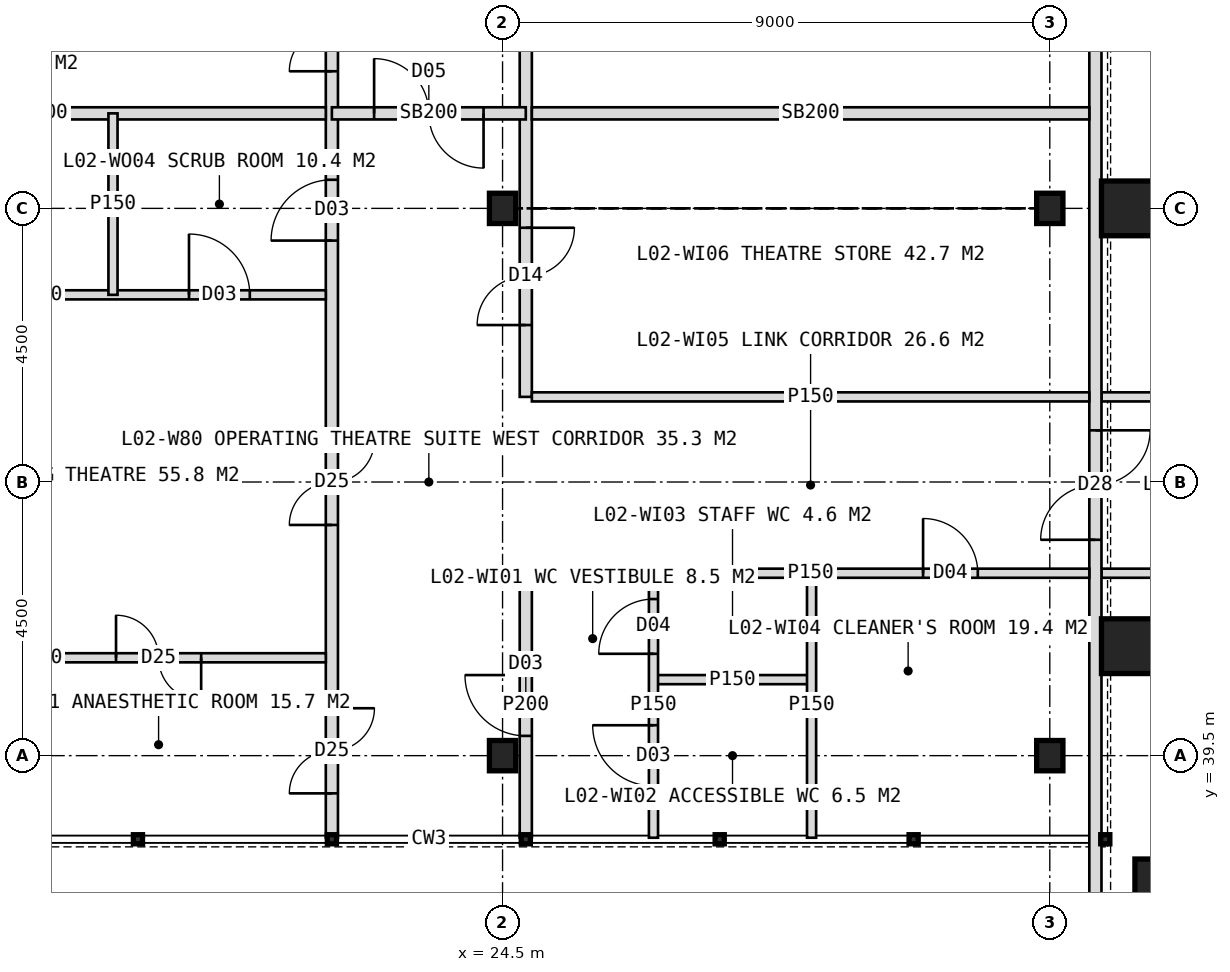
"""IFC4 building model, lengths in metres.
Left out: names, types, materials, properties, quantities, classifications, styles, units other than length and angle.
Written with IfcOpenShell. Run it as: python <this file> out.ifc"""

import sys

from ifc_helpers import new_model, si_unit, direction, frame, frame_2d, origin, origin_2d, place, context, subcontext, project, spatial, rectangle, hollow_rectangle, i_section, extrude, element, fill, save


model = new_model("IFC4")
c1 = context("Model", 3, precision=1e-05, world=origin(), true_north=direction((0.0, 1.0)))
c2 = subcontext(c1, "Body", "Model", "MODEL_VIEW")
j1 = project(units=[si_unit("LENGTHUNIT", "METRE"), si_unit("PLANEANGLEUNIT", "RADIAN")], contexts=[c1])
p1 = place(None, origin())
s1 = spatial("IfcSite", under=j1, at=p1, CompositionType="ELEMENT")
p2 = place(p1, origin())
s2 = spatial("IfcBuilding", under=s1, at=p2, CompositionType="ELEMENT")
p3 = place(p2, frame((0.0, 0.0, 11.0)))
s3 = spatial("IfcBuildingStorey", under=s2, at=p3, CompositionType="ELEMENT", Elevation=11.0)
for number, where, z_axis, x_axis in (
    (1, (34.8, 41.3, 0.0), (0.0, 0.0, 1.0), (1.0, 0.0, 0.0)),
    (2, (34.8, 48.5, 0.0), (0.0, 0.0, 1.0), (1.0, 0.0, 0.0)),
    (3, (35.35, 37.35, 0.0), (0.0, 0.0, 1.0), (1.0, 0.0, 0.0)),
):
    element("IfcColumn", number, at=place(p3, frame(where, z_axis=z_axis, x_axis=x_axis)), inside=s3, PredefinedType="COLUMN", context=c2, shape_type="SweptSolid", body=[
        extrude(hollow_rectangle(XDim=0.9, YDim=0.9, WallThickness=0.08, at=origin_2d()), origin(), (0.0, 0.0, 1.0), 5.5),
    ])
for number, where, z_axis, x_axis in (
    (4, (24.5, 39.5, 0.0), (0.0, 0.0, 1.0), (1.0, 0.0, 0.0)),
    (5, (24.5, 48.5, 0.0), (0.0, 0.0, 1.0), (1.0, 0.0, 0.0)),
    (6, (33.5, 39.5, 0.0), (0.0, 0.0, 1.0), (1.0, 0.0, 0.0)),
    (7, (33.5, 48.5, 0.0), (0.0, 0.0, 1.0), (1.0, 0.0, 0.0)),
):
    element("IfcColumn", number, at=place(p3, frame(where, z_axis=z_axis, x_axis=x_axis)), inside=s3, PredefinedType="COLUMN", context=c2, shape_type="SweptSolid", body=[
        extrude(i_section(OverallWidth=0.432, OverallDepth=0.498, WebThickness=0.056, FlangeThickness=0.089, FilletRadius=0.015, at=origin_2d()), origin(), (0.0, 0.0, 1.0), 5.5),
    ])
for number, where, z_axis, x_axis in (
    (8, (40.5, 42.5, 0.0), (0.0, 0.0, 1.0), (-1.0, 0.0, 0.0)),
    (9, (40.5, 45.4, 0.0), (0.0, 0.0, 1.0), (-1.0, 0.0, 0.0)),
):
    element("IfcWall", number, at=place(p3, frame(where, z_axis=z_axis, x_axis=x_axis)), inside=s3, PredefinedType="PARTITIONING", context=c2, shape_type="SweptSolid", body=[
        extrude(rectangle(XDim=6.15, YDim=0.15, at=frame_2d((3.075, 0.0))), origin(), (0.0, 0.0, 1.0), 5.2),
    ])
p4 = place(p3, frame((21.693, 38.15, 0.0), z_axis=(0.0, 0.0, 1.0), x_axis=(0.0, 1.0, 0.0)))
e10 = element("IfcWall", 10, at=p4, inside=s3, PredefinedType="PARTITIONING", context=c2, shape_type="SweptSolid", body=[
    extrude(rectangle(XDim=47.7, YDim=0.2, at=frame_2d((23.85, 0.0))), origin(), (0.0, 0.0, 1.0), 5.2),
])
p5 = place(p4, frame((45.7, 0.0, 0.0)))
e11 = element("IfcOpeningElement", 11, at=p5, cuts=e10, PredefinedType="OPENING", context=c2, shape_type="SweptSolid", body=[
    extrude(rectangle(XDim=1.2, YDim=2.1, at=frame_2d((0.6, 1.05))), frame((0.0, 0.11, 0.0), z_axis=(0.0, -1.0, 0.0), x_axis=(1.0, 0.0, 0.0)), (0.0, 0.0, 1.0), 0.22),
])
p6 = place(p4, frame((36.244, 0.0, 0.0)))
e12 = element("IfcOpeningElement", 12, at=p6, cuts=e10, PredefinedType="OPENING", context=c2, shape_type="SweptSolid", body=[
    extrude(rectangle(XDim=1.0, YDim=2.1, at=frame_2d((0.5, 1.05))), frame((0.0, 0.11, 0.0), z_axis=(0.0, -1.0, 0.0), x_axis=(1.0, 0.0, 0.0)), (0.0, 0.0, 1.0), 0.22),
])
p7 = place(p4, frame((0.73, 0.0, 0.0)))
e13 = element("IfcOpeningElement", 13, at=p7, cuts=e10, PredefinedType="OPENING", context=c2, shape_type="SweptSolid", body=[
    extrude(rectangle(XDim=1.4, YDim=2.2, at=frame_2d((0.7, 1.1))), frame((0.0, 0.11, 0.0), z_axis=(0.0, -1.0, 0.0), x_axis=(1.0, 0.0, 0.0)), (0.0, 0.0, 1.0), 0.22),
])
p8 = place(p4, frame((5.144, 0.0, 0.0)))
e14 = element("IfcOpeningElement", 14, at=p8, cuts=e10, PredefinedType="OPENING", context=c2, shape_type="SweptSolid", body=[
    extrude(rectangle(XDim=1.4, YDim=2.2, at=frame_2d((0.7, 1.1))), frame((0.0, 0.11, 0.0), z_axis=(0.0, -1.0, 0.0), x_axis=(1.0, 0.0, 0.0)), (0.0, 0.0, 1.0), 0.22),
])
p9 = place(p4, frame((9.82, 0.0, 0.0)))
e15 = element("IfcOpeningElement", 15, at=p9, cuts=e10, PredefinedType="OPENING", context=c2, shape_type="SweptSolid", body=[
    extrude(rectangle(XDim=1.0, YDim=2.1, at=frame_2d((0.5, 1.05))), frame((0.0, 0.11, 0.0), z_axis=(0.0, -1.0, 0.0), x_axis=(1.0, 0.0, 0.0)), (0.0, 0.0, 1.0), 0.22),
])
p10 = place(p4, frame((12.605, 0.0, 0.0)))
e16 = element("IfcOpeningElement", 16, at=p10, cuts=e10, PredefinedType="OPENING", context=c2, shape_type="SweptSolid", body=[
    extrude(rectangle(XDim=1.4, YDim=2.2, at=frame_2d((0.7, 1.1))), frame((0.0, 0.11, 0.0), z_axis=(0.0, -1.0, 0.0), x_axis=(1.0, 0.0, 0.0)), (0.0, 0.0, 1.0), 0.22),
])
p11 = place(p4, frame((17.081, 0.0, 0.0)))
e17 = element("IfcOpeningElement", 17, at=p11, cuts=e10, PredefinedType="OPENING", context=c2, shape_type="SweptSolid", body=[
    extrude(rectangle(XDim=1.4, YDim=2.2, at=frame_2d((0.7, 1.1))), frame((0.0, 0.11, 0.0), z_axis=(0.0, -1.0, 0.0), x_axis=(1.0, 0.0, 0.0)), (0.0, 0.0, 1.0), 0.22),
])
p12 = place(p4, frame((21.758, 0.0, 0.0)))
e18 = element("IfcOpeningElement", 18, at=p12, cuts=e10, PredefinedType="OPENING", context=c2, shape_type="SweptSolid", body=[
    extrude(rectangle(XDim=1.0, YDim=2.1, at=frame_2d((0.5, 1.05))), frame((0.0, 0.11, 0.0), z_axis=(0.0, -1.0, 0.0), x_axis=(1.0, 0.0, 0.0)), (0.0, 0.0, 1.0), 0.22),
])
p13 = place(p4, frame((24.542, 0.0, 0.0)))
e19 = element("IfcOpeningElement", 19, at=p13, cuts=e10, PredefinedType="OPENING", context=c2, shape_type="SweptSolid", body=[
    extrude(rectangle(XDim=1.4, YDim=2.2, at=frame_2d((0.7, 1.1))), frame((0.0, 0.11, 0.0), z_axis=(0.0, -1.0, 0.0), x_axis=(1.0, 0.0, 0.0)), (0.0, 0.0, 1.0), 0.22),
])
p14 = place(p4, frame((29.019, 0.0, 0.0)))
e20 = element("IfcOpeningElement", 20, at=p14, cuts=e10, PredefinedType="OPENING", context=c2, shape_type="SweptSolid", body=[
    extrude(rectangle(XDim=1.4, YDim=2.2, at=frame_2d((0.7, 1.1))), frame((0.0, 0.11, 0.0), z_axis=(0.0, -1.0, 0.0), x_axis=(1.0, 0.0, 0.0)), (0.0, 0.0, 1.0), 0.22),
])
p15 = place(p4, frame((33.695, 0.0, 0.0)))
e21 = element("IfcOpeningElement", 21, at=p15, cuts=e10, PredefinedType="OPENING", context=c2, shape_type="SweptSolid", body=[
    extrude(rectangle(XDim=1.0, YDim=2.1, at=frame_2d((0.5, 1.05))), frame((0.0, 0.11, 0.0), z_axis=(0.0, -1.0, 0.0), x_axis=(1.0, 0.0, 0.0)), (0.0, 0.0, 1.0), 0.22),
])
p16 = place(p3, frame((24.882, 38.15, 0.0), z_axis=(0.0, 0.0, 1.0), x_axis=(0.0, 1.0, 0.0)))
e22 = element("IfcWall", 22, at=p16, inside=s3, PredefinedType="PARTITIONING", context=c2, shape_type="SweptSolid", body=[
    extrude(rectangle(XDim=4.35, YDim=0.2, at=frame_2d((2.175, 0.0))), origin(), (0.0, 0.0, 1.0), 5.2),
])
p17 = place(p16, frame((1.675, 0.0, 0.0)))
e23 = element("IfcOpeningElement", 23, at=p17, cuts=e22, PredefinedType="OPENING", context=c2, shape_type="SweptSolid", body=[
    extrude(rectangle(XDim=1.0, YDim=2.1, at=frame_2d((0.5, 1.05))), frame((0.0, 0.11, 0.0), z_axis=(0.0, -1.0, 0.0), x_axis=(1.0, 0.0, 0.0)), (0.0, 0.0, 1.0), 0.22),
])
p18 = place(p3, frame((24.882, 45.4, 0.0), z_axis=(0.0, 0.0, 1.0), x_axis=(0.0, 1.0, 0.0)))
e24 = element("IfcWall", 24, at=p18, inside=s3, PredefinedType="PARTITIONING", context=c2, shape_type="SweptSolid", body=[
    extrude(rectangle(XDim=16.6, YDim=0.2, at=frame_2d((8.3, 0.0))), origin(), (0.0, 0.0, 1.0), 5.2),
])
p19 = place(p18, frame((1.181, 0.0, 0.0)))
e25 = element("IfcOpeningElement", 25, at=p19, cuts=e24, PredefinedType="OPENING", context=c2, shape_type="SweptSolid", body=[
    extrude(rectangle(XDim=1.6, YDim=2.2, at=frame_2d((0.8, 1.1))), frame((0.0, 0.11, 0.0), z_axis=(0.0, -1.0, 0.0), x_axis=(1.0, 0.0, 0.0)), (0.0, 0.0, 1.0), 0.22),
])
p20 = place(p18, frame((7.881, 0.0, 0.0)))
e26 = element("IfcOpeningElement", 26, at=p20, cuts=e24, PredefinedType="OPENING", context=c2, shape_type="SweptSolid", body=[
    extrude(rectangle(XDim=1.0, YDim=2.1, at=frame_2d((0.5, 1.05))), frame((0.0, 0.11, 0.0), z_axis=(0.0, -1.0, 0.0), x_axis=(1.0, 0.0, 0.0)), (0.0, 0.0, 1.0), 0.22),
])
p21 = place(p18, frame((13.55, 0.0, 0.0)))
e27 = element("IfcOpeningElement", 27, at=p21, cuts=e24, PredefinedType="OPENING", context=c2, shape_type="SweptSolid", body=[
    extrude(rectangle(XDim=1.6, YDim=2.2, at=frame_2d((0.8, 1.1))), frame((0.0, 0.11, 0.0), z_axis=(0.0, -1.0, 0.0), x_axis=(1.0, 0.0, 0.0)), (0.0, 0.0, 1.0), 0.22),
])
p22 = place(p3, frame((21.693, 50.062, 0.0), z_axis=(0.0, 0.0, 1.0), x_axis=(1.0, 0.0, 0.0)))
e28 = element("IfcWall", 28, at=p22, inside=s3, PredefinedType="SOLIDWALL", context=c2, shape_type="SweptSolid", body=[
    extrude(rectangle(XDim=3.189, YDim=0.2, at=frame_2d((1.594, 0.0))), origin(), (0.0, 0.0, 1.0), 5.2),
])
p23 = place(p22, frame((0.695, 0.0, 0.0)))
e29 = element("IfcOpeningElement", 29, at=p23, cuts=e28, PredefinedType="OPENING", context=c2, shape_type="SweptSolid", body=[
    extrude(rectangle(XDim=1.8, YDim=2.2, at=frame_2d((0.9, 1.1))), frame((0.0, 0.11, 0.0), z_axis=(0.0, -1.0, 0.0), x_axis=(1.0, 0.0, 0.0)), (0.0, 0.0, 1.0), 0.22),
])
p24 = place(p3, frame((34.25, 36.8, 0.0), z_axis=(0.0, 0.0, 1.0), x_axis=(0.0, 1.0, 0.0)))
e30 = element("IfcWall", 30, at=p24, inside=s3, PredefinedType="SOLIDWALL", context=c2, shape_type="SweptSolid", body=[
    extrude(rectangle(XDim=50.4, YDim=0.2, at=frame_2d((25.2, 0.0))), origin(), (0.0, 0.0, 1.0), 5.2),
])
p25 = place(p24, frame((6.25, 0.0, 0.0)))
e31 = element("IfcOpeningElement", 31, at=p25, cuts=e30, PredefinedType="OPENING", context=c2, shape_type="SweptSolid", body=[
    extrude(rectangle(XDim=1.8, YDim=2.2, at=frame_2d((0.9, 1.1))), frame((0.0, 0.11, 0.0), z_axis=(0.0, -1.0, 0.0), x_axis=(1.0, 0.0, 0.0)), (0.0, 0.0, 1.0), 0.22),
])
p26 = place(p24, frame((25.55, 0.0, 0.0)))
e32 = element("IfcOpeningElement", 32, at=p26, cuts=e30, PredefinedType="OPENING", context=c2, shape_type="SweptSolid", body=[
    extrude(rectangle(XDim=1.8, YDim=2.2, at=frame_2d((0.9, 1.1))), frame((0.0, 0.11, 0.0), z_axis=(0.0, -1.0, 0.0), x_axis=(1.0, 0.0, 0.0)), (0.0, 0.0, 1.0), 0.22),
])
p27 = place(p3, frame((12.15, 41.109, 0.0), z_axis=(0.0, 0.0, 1.0), x_axis=(1.0, 0.0, 0.0)))
e33 = element("IfcWall", 33, at=p27, inside=s3, PredefinedType="PARTITIONING", context=c2, shape_type="SweptSolid", body=[
    extrude(rectangle(XDim=9.443, YDim=0.15, at=frame_2d((4.722, 0.0))), origin(), (0.0, 0.0, 1.0), 5.2),
])
p28 = place(p27, frame((5.993, 0.0, 0.0)))
e34 = element("IfcOpeningElement", 34, at=p28, cuts=e33, PredefinedType="OPENING", context=c2, shape_type="SweptSolid", body=[
    extrude(rectangle(XDim=1.4, YDim=2.2, at=frame_2d((0.7, 1.1))), frame((0.0, 0.085, 0.0), z_axis=(0.0, -1.0, 0.0), x_axis=(1.0, 0.0, 0.0)), (0.0, 0.0, 1.0), 0.17),
])
p29 = place(p27, frame((1.521, 0.0, 0.0)))
e35 = element("IfcOpeningElement", 35, at=p29, cuts=e33, PredefinedType="OPENING", context=c2, shape_type="SweptSolid", body=[
    extrude(rectangle(XDim=1.0, YDim=2.1, at=frame_2d((0.5, 1.05))), frame((0.0, 0.085, 0.0), z_axis=(0.0, -1.0, 0.0), x_axis=(1.0, 0.0, 0.0)), (0.0, 0.0, 1.0), 0.17),
])
p30 = place(p3, frame((12.15, 47.078, 0.0), z_axis=(0.0, 0.0, 1.0), x_axis=(1.0, 0.0, 0.0)))
e36 = element("IfcWall", 36, at=p30, inside=s3, PredefinedType="PARTITIONING", context=c2, shape_type="SweptSolid", body=[
    extrude(rectangle(XDim=9.443, YDim=0.15, at=frame_2d((4.722, 0.0))), origin(), (0.0, 0.0, 1.0), 5.2),
])
p31 = place(p30, frame((7.193, 0.0, 0.0)))
e37 = element("IfcOpeningElement", 37, at=p31, cuts=e36, PredefinedType="OPENING", context=c2, shape_type="SweptSolid", body=[
    extrude(rectangle(XDim=1.0, YDim=2.1, at=frame_2d((0.5, 1.05))), frame((0.0, 0.085, 0.0), z_axis=(0.0, -1.0, 0.0), x_axis=(1.0, 0.0, 0.0)), (0.0, 0.0, 1.0), 0.17),
])
p32 = place(p30, frame((2.271, 0.0, 0.0)))
e38 = element("IfcOpeningElement", 38, at=p32, cuts=e36, PredefinedType="OPENING", context=c2, shape_type="SweptSolid", body=[
    extrude(rectangle(XDim=1.0, YDim=2.1, at=frame_2d((0.5, 1.05))), frame((0.0, 0.085, 0.0), z_axis=(0.0, -1.0, 0.0), x_axis=(1.0, 0.0, 0.0)), (0.0, 0.0, 1.0), 0.17),
])
p33 = place(p3, frame((12.15, 50.062, 0.0), z_axis=(0.0, 0.0, 1.0), x_axis=(1.0, 0.0, 0.0)))
e39 = element("IfcWall", 39, at=p33, inside=s3, PredefinedType="SOLIDWALL", context=c2, shape_type="SweptSolid", body=[
    extrude(rectangle(XDim=9.443, YDim=0.2, at=frame_2d((4.722, 0.0))), origin(), (0.0, 0.0, 1.0), 5.2),
])
p34 = place(p3, frame((18.093, 47.078, 0.0), z_axis=(0.0, 0.0, 1.0), x_axis=(0.0, 1.0, 0.0)))
e40 = element("IfcWall", 40, at=p34, inside=s3, PredefinedType="PARTITIONING", context=c2, shape_type="SweptSolid", body=[
    extrude(rectangle(XDim=2.984, YDim=0.15, at=frame_2d((1.492, 0.0))), origin(), (0.0, 0.0, 1.0), 5.2),
])
p35 = place(p3, frame((26.982, 40.75, 0.0), z_axis=(0.0, 0.0, 1.0), x_axis=(1.0, 0.0, 0.0)))
e41 = element("IfcWall", 41, at=p35, inside=s3, PredefinedType="PARTITIONING", context=c2, shape_type="SweptSolid", body=[
    extrude(rectangle(XDim=2.6, YDim=0.15, at=frame_2d((1.3, 0.0))), origin(), (0.0, 0.0, 1.0), 5.2),
])
p36 = place(p3, frame((24.982, 42.5, 0.0), z_axis=(0.0, 0.0, 1.0), x_axis=(1.0, 0.0, 0.0)))
e42 = element("IfcWall", 42, at=p36, inside=s3, PredefinedType="PARTITIONING", context=c2, shape_type="SweptSolid", body=[
    extrude(rectangle(XDim=9.168, YDim=0.15, at=frame_2d((4.584, 0.0))), origin(), (0.0, 0.0, 1.0), 5.2),
])
p37 = place(p36, frame((6.434, 0.0, 0.0)))
e43 = element("IfcOpeningElement", 43, at=p37, cuts=e42, PredefinedType="OPENING", context=c2, shape_type="SweptSolid", body=[
    extrude(rectangle(XDim=0.9, YDim=2.1, at=frame_2d((0.45, 1.05))), frame((0.0, 0.085, 0.0), z_axis=(0.0, -1.0, 0.0), x_axis=(1.0, 0.0, 0.0)), (0.0, 0.0, 1.0), 0.17),
])
p38 = place(p3, frame((24.982, 45.4, 0.0), z_axis=(0.0, 0.0, 1.0), x_axis=(1.0, 0.0, 0.0)))
e44 = element("IfcWall", 44, at=p38, inside=s3, PredefinedType="PARTITIONING", context=c2, shape_type="SweptSolid", body=[
    extrude(rectangle(XDim=9.168, YDim=0.15, at=frame_2d((4.584, 0.0))), origin(), (0.0, 0.0, 1.0), 5.2),
])
p39 = place(p3, frame((24.982, 50.062, 0.0), z_axis=(0.0, 0.0, 1.0), x_axis=(1.0, 0.0, 0.0)))
e45 = element("IfcWall", 45, at=p39, inside=s3, PredefinedType="SOLIDWALL", context=c2, shape_type="SweptSolid", body=[
    extrude(rectangle(XDim=9.168, YDim=0.2, at=frame_2d((4.584, 0.0))), origin(), (0.0, 0.0, 1.0), 5.2),
])
p40 = place(p3, frame((26.982, 38.15, 0.0), z_axis=(0.0, 0.0, 1.0), x_axis=(0.0, 1.0, 0.0)))
e46 = element("IfcWall", 46, at=p40, inside=s3, PredefinedType="PARTITIONING", context=c2, shape_type="SweptSolid", body=[
    extrude(rectangle(XDim=4.35, YDim=0.15, at=frame_2d((2.175, 0.0))), origin(), (0.0, 0.0, 1.0), 5.2),
])
p41 = place(p40, frame((0.85, 0.0, 0.0)))
e47 = element("IfcOpeningElement", 47, at=p41, cuts=e46, PredefinedType="OPENING", context=c2, shape_type="SweptSolid", body=[
    extrude(rectangle(XDim=1.0, YDim=2.1, at=frame_2d((0.5, 1.05))), frame((0.0, 0.085, 0.0), z_axis=(0.0, -1.0, 0.0), x_axis=(1.0, 0.0, 0.0)), (0.0, 0.0, 1.0), 0.17),
])
p42 = place(p40, frame((3.025, 0.0, 0.0)))
e48 = element("IfcOpeningElement", 48, at=p42, cuts=e46, PredefinedType="OPENING", context=c2, shape_type="SweptSolid", body=[
    extrude(rectangle(XDim=0.9, YDim=2.1, at=frame_2d((0.45, 1.05))), frame((0.0, 0.085, 0.0), z_axis=(0.0, -1.0, 0.0), x_axis=(1.0, 0.0, 0.0)), (0.0, 0.0, 1.0), 0.17),
])
p43 = place(p3, frame((29.582, 38.15, 0.0), z_axis=(0.0, 0.0, 1.0), x_axis=(0.0, 1.0, 0.0)))
e49 = element("IfcWall", 49, at=p43, inside=s3, PredefinedType="PARTITIONING", context=c2, shape_type="SweptSolid", body=[
    extrude(rectangle(XDim=4.35, YDim=0.15, at=frame_2d((2.175, 0.0))), origin(), (0.0, 0.0, 1.0), 5.2),
])
p44 = place(p23, origin())
e50 = element("IfcDoor", 50, at=p44, inside=s3, OperationType="DOUBLE_DOOR_DOUBLE_SWING", PredefinedType="DOOR", context=c2, shape_type="SweptSolid", body=[
    extrude(rectangle(XDim=1.8, YDim=2.2, at=frame_2d((0.9, 1.1))), frame((0.0, 0.025, 0.0), z_axis=(0.0, -1.0, 0.0), x_axis=(1.0, 0.0, 0.0)), (0.0, 0.0, 1.0), 0.05),
])
fill(e29, e50)
p45 = place(p25, origin())
e51 = element("IfcDoor", 51, at=p45, inside=s3, OperationType="DOUBLE_DOOR_SINGLE_SWING", PredefinedType="DOOR", context=c2, shape_type="SweptSolid", body=[
    extrude(rectangle(XDim=1.8, YDim=2.2, at=frame_2d((0.9, 1.1))), frame((0.0, 0.025, 0.0), z_axis=(0.0, -1.0, 0.0), x_axis=(1.0, 0.0, 0.0)), (0.0, 0.0, 1.0), 0.05),
])
fill(e31, e51)
p46 = place(p7, origin())
e52 = element("IfcDoor", 52, at=p46, inside=s3, OperationType="DOUBLE_DOOR_SINGLE_SWING", PredefinedType="DOOR", context=c2, shape_type="SweptSolid", body=[
    extrude(rectangle(XDim=1.4, YDim=2.2, at=frame_2d((0.7, 1.1))), frame((0.0, 0.025, 0.0), z_axis=(0.0, -1.0, 0.0), x_axis=(1.0, 0.0, 0.0)), (0.0, 0.0, 1.0), 0.05),
])
fill(e13, e52)
p47 = place(p28, origin())
e53 = element("IfcDoor", 53, at=p47, inside=s3, OperationType="DOUBLE_DOOR_SINGLE_SWING", PredefinedType="DOOR", context=c2, shape_type="SweptSolid", body=[
    extrude(rectangle(XDim=1.4, YDim=2.2, at=frame_2d((0.7, 1.1))), frame((0.0, 0.025, 0.0), z_axis=(0.0, -1.0, 0.0), x_axis=(1.0, 0.0, 0.0)), (0.0, 0.0, 1.0), 0.05),
])
fill(e34, e53)
p48 = place(p8, origin())
e54 = element("IfcDoor", 54, at=p48, inside=s3, OperationType="DOUBLE_DOOR_SINGLE_SWING", PredefinedType="DOOR", context=c2, shape_type="SweptSolid", body=[
    extrude(rectangle(XDim=1.4, YDim=2.2, at=frame_2d((0.7, 1.1))), frame((0.0, 0.025, 0.0), z_axis=(0.0, -1.0, 0.0), x_axis=(1.0, 0.0, 0.0)), (0.0, 0.0, 1.0), 0.05),
])
fill(e14, e54)
p49 = place(p9, origin())
e55 = element("IfcDoor", 55, at=p49, inside=s3, OperationType="SINGLE_SWING_LEFT", PredefinedType="DOOR", context=c2, shape_type="SweptSolid", body=[
    extrude(rectangle(XDim=1.0, YDim=2.1, at=frame_2d((0.5, 1.05))), frame((0.0, 0.025, 0.0), z_axis=(0.0, -1.0, 0.0), x_axis=(1.0, 0.0, 0.0)), (0.0, 0.0, 1.0), 0.05),
])
fill(e15, e55)
p50 = place(p31, origin())
e56 = element("IfcDoor", 56, at=p50, inside=s3, OperationType="SINGLE_SWING_LEFT", PredefinedType="DOOR", context=c2, shape_type="SweptSolid", body=[
    extrude(rectangle(XDim=1.0, YDim=2.1, at=frame_2d((0.5, 1.05))), frame((0.0, 0.025, 0.0), z_axis=(0.0, -1.0, 0.0), x_axis=(1.0, 0.0, 0.0)), (0.0, 0.0, 1.0), 0.05),
])
fill(e37, e56)
p51 = place(p10, origin())
e57 = element("IfcDoor", 57, at=p51, inside=s3, OperationType="DOUBLE_DOOR_SINGLE_SWING", PredefinedType="DOOR", context=c2, shape_type="SweptSolid", body=[
    extrude(rectangle(XDim=1.4, YDim=2.2, at=frame_2d((0.7, 1.1))), frame((0.0, 0.025, 0.0), z_axis=(0.0, -1.0, 0.0), x_axis=(1.0, 0.0, 0.0)), (0.0, 0.0, 1.0), 0.05),
])
fill(e16, e57)
p52 = place(p17, origin())
e58 = element("IfcDoor", 58, at=p52, inside=s3, OperationType="SINGLE_SWING_RIGHT", PredefinedType="DOOR", context=c2, shape_type="SweptSolid", body=[
    extrude(rectangle(XDim=1.0, YDim=2.1, at=frame_2d((0.5, 1.05))), frame((0.0, 0.025, 0.0), z_axis=(0.0, -1.0, 0.0), x_axis=(1.0, 0.0, 0.0)), (0.0, 0.0, 1.0), 0.05),
])
fill(e23, e58)
p53 = place(p41, origin())
e59 = element("IfcDoor", 59, at=p53, inside=s3, OperationType="SINGLE_SWING_RIGHT", PredefinedType="DOOR", context=c2, shape_type="SweptSolid", body=[
    extrude(rectangle(XDim=1.0, YDim=2.1, at=frame_2d((0.5, 1.05))), frame((0.0, 0.025, 0.0), z_axis=(0.0, -1.0, 0.0), x_axis=(1.0, 0.0, 0.0)), (0.0, 0.0, 1.0), 0.05),
])
fill(e47, e59)
p54 = place(p42, origin())
e60 = element("IfcDoor", 60, at=p54, inside=s3, OperationType="SINGLE_SWING_LEFT", PredefinedType="DOOR", context=c2, shape_type="SweptSolid", body=[
    extrude(rectangle(XDim=0.9, YDim=2.1, at=frame_2d((0.45, 1.05))), frame((0.0, 0.025, 0.0), z_axis=(0.0, -1.0, 0.0), x_axis=(1.0, 0.0, 0.0)), (0.0, 0.0, 1.0), 0.05),
])
fill(e48, e60)
p55 = place(p37, origin())
e61 = element("IfcDoor", 61, at=p55, inside=s3, OperationType="SINGLE_SWING_LEFT", PredefinedType="DOOR", context=c2, shape_type="SweptSolid", body=[
    extrude(rectangle(XDim=0.9, YDim=2.1, at=frame_2d((0.45, 1.05))), frame((0.0, 0.025, 0.0), z_axis=(0.0, -1.0, 0.0), x_axis=(1.0, 0.0, 0.0)), (0.0, 0.0, 1.0), 0.05),
])
fill(e43, e61)
p56 = place(p19, origin())
e62 = element("IfcDoor", 62, at=p56, inside=s3, OperationType="DOUBLE_DOOR_DOUBLE_SWING", PredefinedType="DOOR", context=c2, shape_type="SweptSolid", body=[
    extrude(rectangle(XDim=1.6, YDim=2.2, at=frame_2d((0.8, 1.1))), frame((0.0, 0.025, 0.0), z_axis=(0.0, -1.0, 0.0), x_axis=(1.0, 0.0, 0.0)), (0.0, 0.0, 1.0), 0.05),
])
fill(e25, e62)
save(model, sys.argv[1])
